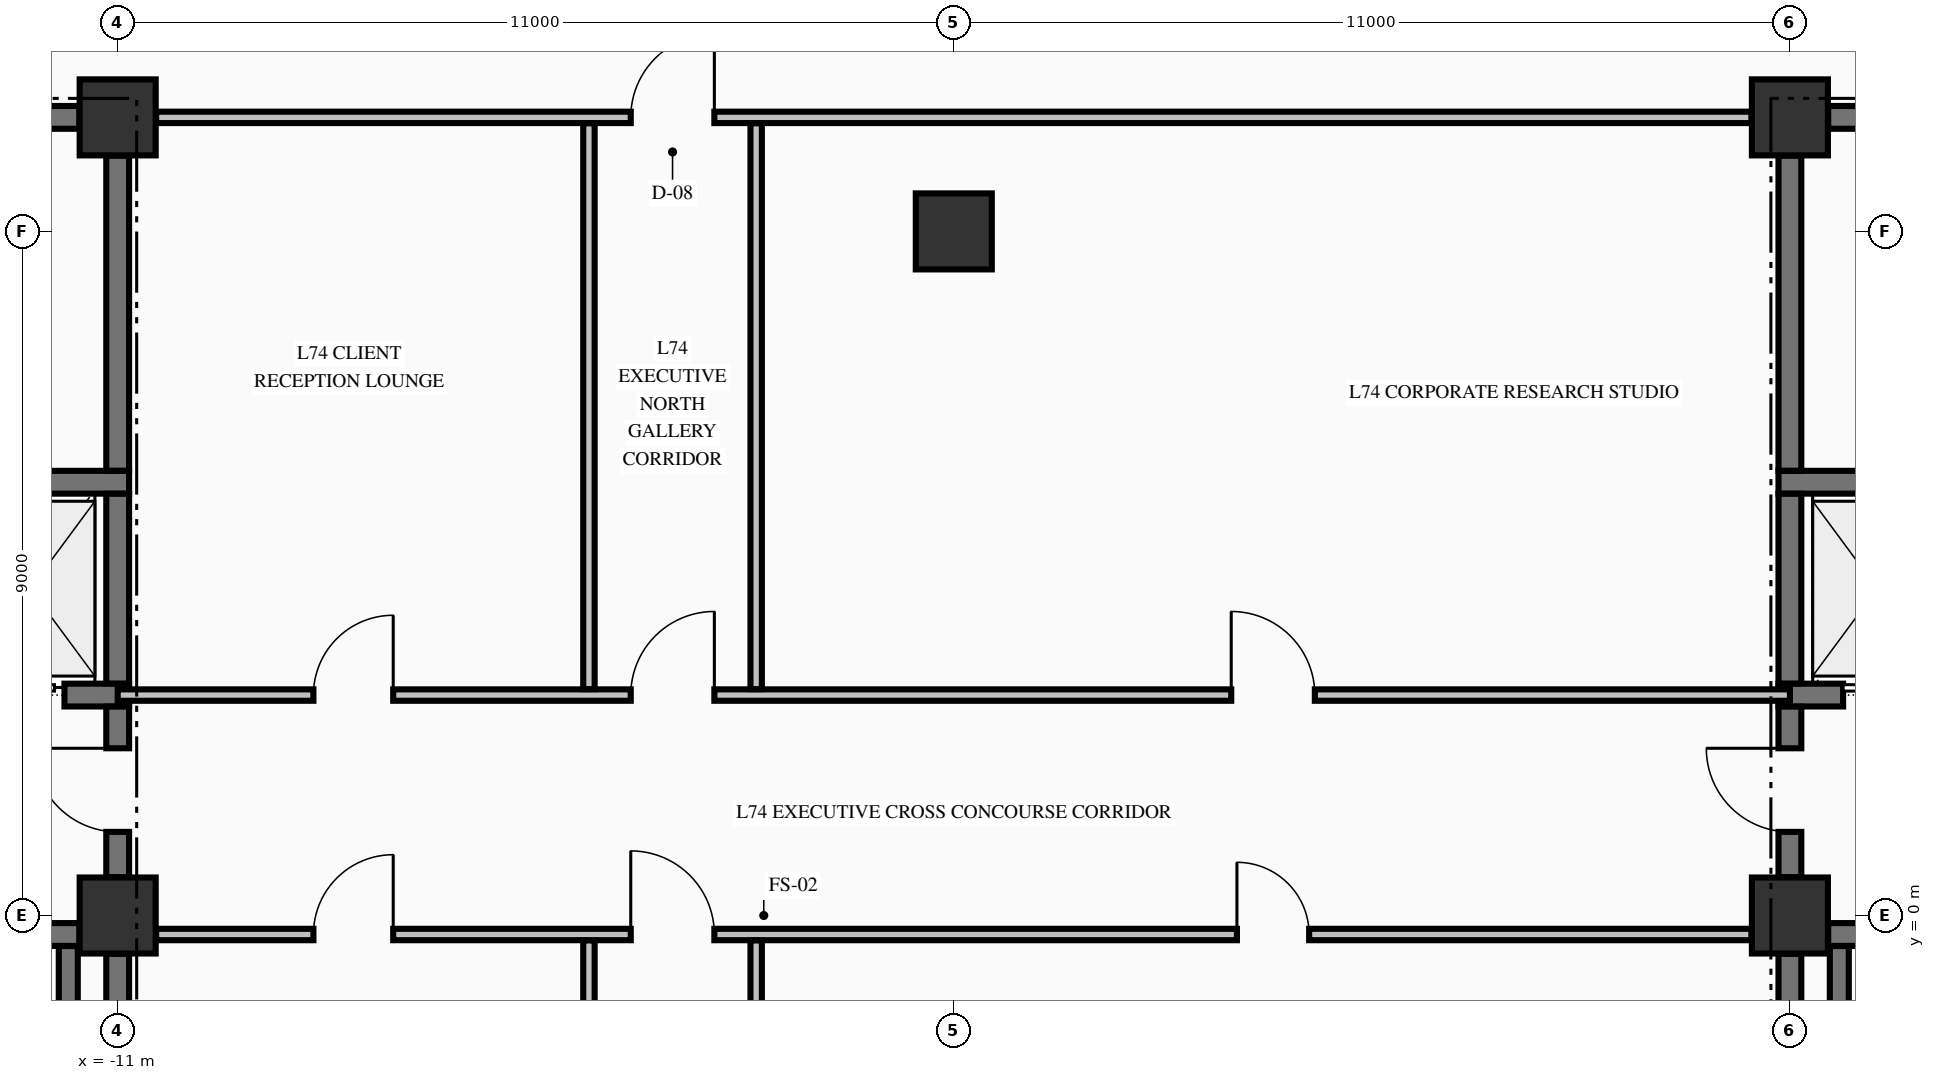
"""IFC4 building model, lengths in metres.
Left out: names, types, materials, properties, quantities, classifications, styles, units other than length and angle.
Written with IfcOpenShell. Run it as: python <this file> out.ifc"""

import sys

from ifc_helpers import new_model, si_unit, direction, frame, frame_2d, origin, origin_2d, place, context, subcontext, project, spatial, rectangle, extrude, element, fill, save


model = new_model("IFC4")
c1 = context("Model", 3, precision=1e-05, world=origin(), true_north=direction((0.0, 1.0)))
c2 = subcontext(c1, "Body", "Model", "MODEL_VIEW")
j1 = project(units=[si_unit("LENGTHUNIT", "METRE"), si_unit("PLANEANGLEUNIT", "RADIAN")], contexts=[c1])
p1 = place(None, origin())
s1 = spatial("IfcSite", under=j1, at=p1, CompositionType="ELEMENT")
p2 = place(p1, origin())
s2 = spatial("IfcBuilding", under=s1, at=p2, CompositionType="ELEMENT")
p3 = place(p2, frame((0.0, 0.0, 278.06)))
s3 = spatial("IfcBuildingStorey", under=s2, at=p3, CompositionType="ELEMENT", Elevation=278.06)
for number, where, z_axis, x_axis in (
    (1, (-11.0, 0.0, -0.425), (0.0, 0.0, 1.0), (1.0, 0.0, 0.0)),
    (2, (-11.0, 10.5, -0.425), (0.0, 0.0, 1.0), (1.0, 0.0, 0.0)),
    (3, (11.0, 0.0, -0.425), (0.0, 0.0, 1.0), (1.0, 0.0, 0.0)),
    (4, (11.0, 10.5, -0.425), (0.0, 0.0, 1.0), (1.0, 0.0, 0.0)),
    (5, (0.0, 9.0, -0.425), (0.0, 0.0, 1.0), (1.0, 0.0, 0.0)),
):
    element("IfcColumn", number, at=place(p3, frame(where, z_axis=z_axis, x_axis=x_axis)), inside=s3, PredefinedType="COLUMN", context=c2, shape_type="SweptSolid", body=[
        extrude(rectangle(XDim=1.0, YDim=1.0, at=origin_2d()), origin(), (0.0, 0.0, 1.0), 3.84),
    ])
p4 = place(p3, frame((-19.496, -0.25, 0.0), z_axis=(0.0, 0.0, 1.0), x_axis=(1.0, 0.0, 0.0)))
e6 = element("IfcWall", 6, at=p4, inside=s3, PredefinedType="SHEAR", context=c2, shape_type="SweptSolid", body=[
    extrude(rectangle(XDim=7.992, YDim=0.3, at=frame_2d((3.996, 0.0))), origin(), (0.0, 0.0, 1.0), 3.415),
])
p5 = place(p4, frame((5.796, 0.0, 0.0)))
e7 = element("IfcOpeningElement", 7, at=p5, cuts=e6, PredefinedType="OPENING", context=c2, shape_type="SweptSolid", body=[
    extrude(rectangle(XDim=1.1, YDim=2.15, at=frame_2d((0.55, 1.075))), frame((0.0, 0.16, 0.0), z_axis=(0.0, -1.0, 0.0), x_axis=(1.0, 0.0, 0.0)), (0.0, 0.0, 1.0), 0.32),
])
p6 = place(p3, frame((11.504, -0.25, 0.0), z_axis=(0.0, 0.0, 1.0), x_axis=(1.0, 0.0, 0.0)))
e8 = element("IfcWall", 8, at=p6, inside=s3, PredefinedType="SHEAR", context=c2, shape_type="SweptSolid", body=[
    extrude(rectangle(XDim=3.371, YDim=0.3, at=frame_2d((1.686, 0.0))), origin(), (0.0, 0.0, 1.0), 3.415),
])
p7 = place(p6, frame((1.096, 0.0, 0.0)))
e9 = element("IfcOpeningElement", 9, at=p7, cuts=e8, PredefinedType="OPENING", context=c2, shape_type="SweptSolid", body=[
    extrude(rectangle(XDim=1.1, YDim=2.15, at=frame_2d((0.55, 1.075))), frame((0.0, 0.16, 0.0), z_axis=(0.0, -1.0, 0.0), x_axis=(1.0, 0.0, 0.0)), (0.0, 0.0, 1.0), 0.32),
])
p8 = place(p3, frame((-14.875, 2.9, 0.0), z_axis=(0.0, 0.0, 1.0), x_axis=(1.0, 0.0, 0.0)))
e10 = element("IfcWall", 10, at=p8, inside=s3, PredefinedType="SHEAR", context=c2, shape_type="SweptSolid", body=[
    extrude(rectangle(XDim=4.025, YDim=0.3, at=frame_2d((2.012, 0.0))), origin(), (0.0, 0.0, 1.0), 3.415),
])
p9 = place(p8, frame((2.075, 0.0, 0.0)))
e11 = element("IfcOpeningElement", 11, at=p9, cuts=e10, PredefinedType="OPENING", context=c2, shape_type="SweptSolid", body=[
    extrude(rectangle(XDim=1.1, YDim=2.2, at=frame_2d((0.55, 1.1))), frame((0.0, 0.16, 0.0), z_axis=(0.0, -1.0, 0.0), x_axis=(1.0, 0.0, 0.0)), (0.0, 0.0, 1.0), 0.32),
])
p10 = place(p3, frame((10.85, 2.9, 0.0), z_axis=(0.0, 0.0, 1.0), x_axis=(1.0, 0.0, 0.0)))
e12 = element("IfcWall", 12, at=p10, inside=s3, PredefinedType="SHEAR", context=c2, shape_type="SweptSolid", body=[
    extrude(rectangle(XDim=4.025, YDim=0.3, at=frame_2d((2.012, 0.0))), origin(), (0.0, 0.0, 1.0), 3.415),
])
p11 = place(p10, frame((0.85, 0.0, 0.0)))
e13 = element("IfcOpeningElement", 13, at=p11, cuts=e12, PredefinedType="OPENING", context=c2, shape_type="SweptSolid", body=[
    extrude(rectangle(XDim=1.1, YDim=2.2, at=frame_2d((0.55, 1.1))), frame((0.0, 0.16, 0.0), z_axis=(0.0, -1.0, 0.0), x_axis=(1.0, 0.0, 0.0)), (0.0, 0.0, 1.0), 0.32),
])
for number, where, z_axis, x_axis in (
    (14, (-14.875, 5.7, 0.0), (0.0, 0.0, 1.0), (1.0, 0.0, 0.0)),
    (15, (10.85, 5.7, 0.0), (0.0, 0.0, 1.0), (1.0, 0.0, 0.0)),
):
    element("IfcWall", number, at=place(p3, frame(where, z_axis=z_axis, x_axis=x_axis)), inside=s3, PredefinedType="SHEAR", context=c2, shape_type="SweptSolid", body=[
        extrude(rectangle(XDim=4.025, YDim=0.3, at=frame_2d((2.012, 0.0))), origin(), (0.0, 0.0, 1.0), 3.415),
    ])
p12 = place(p3, frame((-14.7, 10.5, 0.0), z_axis=(0.0, 0.0, 1.0), x_axis=(1.0, 0.0, 0.0)))
e16 = element("IfcWall", 16, at=p12, inside=s3, PredefinedType="SHEAR", context=c2, shape_type="SweptSolid", body=[
    extrude(rectangle(XDim=3.196, YDim=0.3, at=frame_2d((1.598, 0.0))), origin(), (0.0, 0.0, 1.0), 3.415),
])
p13 = place(p12, frame((0.775, 0.0, 0.0)))
e17 = element("IfcOpeningElement", 17, at=p13, cuts=e16, PredefinedType="OPENING", context=c2, shape_type="SweptSolid", body=[
    extrude(rectangle(XDim=0.95, YDim=2.15, at=frame_2d((0.475, 1.075))), frame((0.0, 0.16, 0.0), z_axis=(0.0, -1.0, 0.0), x_axis=(1.0, 0.0, 0.0)), (0.0, 0.0, 1.0), 0.32),
])
p14 = place(p3, frame((11.504, 10.5, 0.0), z_axis=(0.0, 0.0, 1.0), x_axis=(1.0, 0.0, 0.0)))
e18 = element("IfcWall", 18, at=p14, inside=s3, PredefinedType="SHEAR", context=c2, shape_type="SweptSolid", body=[
    extrude(rectangle(XDim=3.196, YDim=0.3, at=frame_2d((1.598, 0.0))), origin(), (0.0, 0.0, 1.0), 3.415),
])
p15 = place(p14, frame((1.471, 0.0, 0.0)))
e19 = element("IfcOpeningElement", 19, at=p15, cuts=e18, PredefinedType="OPENING", context=c2, shape_type="SweptSolid", body=[
    extrude(rectangle(XDim=0.95, YDim=2.15, at=frame_2d((0.475, 1.075))), frame((0.0, 0.16, 0.0), z_axis=(0.0, -1.0, 0.0), x_axis=(1.0, 0.0, 0.0)), (0.0, 0.0, 1.0), 0.32),
])
p16 = place(p3, frame((-10.494, -0.25, 0.0), z_axis=(0.0, 0.0, 1.0), x_axis=(1.0, 0.0, 0.0)))
e20 = element("IfcWall", 20, at=p16, inside=s3, PredefinedType="PARTITIONING", context=c2, shape_type="SweptSolid", body=[
    extrude(rectangle(XDim=20.988, YDim=0.15, at=frame_2d((10.494, 0.0))), origin(), (0.0, 0.0, 1.0), 3.415),
])
p17 = place(p16, frame((6.244, 0.0, 0.0)))
e21 = element("IfcOpeningElement", 21, at=p17, cuts=e20, PredefinedType="OPENING", context=c2, shape_type="SweptSolid", body=[
    extrude(rectangle(XDim=1.1, YDim=2.15, at=frame_2d((0.55, 1.075))), frame((0.0, 0.085, 0.0), z_axis=(0.0, -1.0, 0.0), x_axis=(1.0, 0.0, 0.0)), (0.0, 0.0, 1.0), 0.17),
])
p18 = place(p16, frame((2.069, 0.0, 0.0)))
e22 = element("IfcOpeningElement", 22, at=p18, cuts=e20, PredefinedType="OPENING", context=c2, shape_type="SweptSolid", body=[
    extrude(rectangle(XDim=1.05, YDim=2.15, at=frame_2d((0.525, 1.075))), frame((0.0, 0.085, 0.0), z_axis=(0.0, -1.0, 0.0), x_axis=(1.0, 0.0, 0.0)), (0.0, 0.0, 1.0), 0.17),
])
p19 = place(p16, frame((14.219, 0.0, 0.0)))
e23 = element("IfcOpeningElement", 23, at=p19, cuts=e20, PredefinedType="OPENING", context=c2, shape_type="SweptSolid", body=[
    extrude(rectangle(XDim=0.95, YDim=2.15, at=frame_2d((0.475, 1.075))), frame((0.0, 0.085, 0.0), z_axis=(0.0, -1.0, 0.0), x_axis=(1.0, 0.0, 0.0)), (0.0, 0.0, 1.0), 0.17),
])
p20 = place(p3, frame((-11.0, 2.9, 0.0), z_axis=(0.0, 0.0, 1.0), x_axis=(1.0, 0.0, 0.0)))
e24 = element("IfcWall", 24, at=p20, inside=s3, PredefinedType="PARTITIONING", context=c2, shape_type="SweptSolid", body=[
    extrude(rectangle(XDim=22.0, YDim=0.15, at=frame_2d((11.0, 0.0))), origin(), (0.0, 0.0, 1.0), 3.415),
])
p21 = place(p20, frame((6.75, 0.0, 0.0)))
e25 = element("IfcOpeningElement", 25, at=p21, cuts=e24, PredefinedType="OPENING", context=c2, shape_type="SweptSolid", body=[
    extrude(rectangle(XDim=1.1, YDim=2.15, at=frame_2d((0.55, 1.075))), frame((0.0, 0.085, 0.0), z_axis=(0.0, -1.0, 0.0), x_axis=(1.0, 0.0, 0.0)), (0.0, 0.0, 1.0), 0.17),
])
p22 = place(p20, frame((2.575, 0.0, 0.0)))
e26 = element("IfcOpeningElement", 26, at=p22, cuts=e24, PredefinedType="OPENING", context=c2, shape_type="SweptSolid", body=[
    extrude(rectangle(XDim=1.05, YDim=2.15, at=frame_2d((0.525, 1.075))), frame((0.0, 0.085, 0.0), z_axis=(0.0, -1.0, 0.0), x_axis=(1.0, 0.0, 0.0)), (0.0, 0.0, 1.0), 0.17),
])
p23 = place(p20, frame((14.65, 0.0, 0.0)))
e27 = element("IfcOpeningElement", 27, at=p23, cuts=e24, PredefinedType="OPENING", context=c2, shape_type="SweptSolid", body=[
    extrude(rectangle(XDim=1.1, YDim=2.15, at=frame_2d((0.55, 1.075))), frame((0.0, 0.085, 0.0), z_axis=(0.0, -1.0, 0.0), x_axis=(1.0, 0.0, 0.0)), (0.0, 0.0, 1.0), 0.17),
])
p24 = place(p3, frame((-10.494, 10.5, 0.0), z_axis=(0.0, 0.0, 1.0), x_axis=(1.0, 0.0, 0.0)))
e28 = element("IfcWall", 28, at=p24, inside=s3, PredefinedType="PARTITIONING", context=c2, shape_type="SweptSolid", body=[
    extrude(rectangle(XDim=20.988, YDim=0.15, at=frame_2d((10.494, 0.0))), origin(), (0.0, 0.0, 1.0), 3.415),
])
p25 = place(p24, frame((6.244, 0.0, 0.0)))
e29 = element("IfcOpeningElement", 29, at=p25, cuts=e28, PredefinedType="OPENING", context=c2, shape_type="SweptSolid", body=[
    extrude(rectangle(XDim=1.1, YDim=2.15, at=frame_2d((0.55, 1.075))), frame((0.0, 0.085, 0.0), z_axis=(0.0, -1.0, 0.0), x_axis=(1.0, 0.0, 0.0)), (0.0, 0.0, 1.0), 0.17),
])
p26 = place(p3, frame((-11.65, -9.798, 0.0), z_axis=(0.0, 0.0, 1.0), x_axis=(0.0, 1.0, 0.0)))
e30 = element("IfcWall", 30, at=p26, inside=s3, PredefinedType="SOLIDWALL", context=c2, shape_type="SweptSolid", body=[
    extrude(rectangle(XDim=9.396, YDim=0.25, at=frame_2d((4.698, 0.0))), origin(), (0.0, 0.0, 1.0), 3.415),
])
p27 = place(p3, frame((-11.0, -9.446, 0.0), z_axis=(0.0, 0.0, 1.0), x_axis=(0.0, 1.0, 0.0)))
e31 = element("IfcWall", 31, at=p27, inside=s3, PredefinedType="SHEAR", context=c2, shape_type="SweptSolid", body=[
    extrude(rectangle(XDim=8.942, YDim=0.3, at=frame_2d((4.471, 0.0))), origin(), (0.0, 0.0, 1.0), 3.415),
])
p28 = place(p3, frame((-11.0, 0.504, 0.0), z_axis=(0.0, 0.0, 1.0), x_axis=(0.0, 1.0, 0.0)))
e32 = element("IfcWall", 32, at=p28, inside=s3, PredefinedType="SHEAR", context=c2, shape_type="SweptSolid", body=[
    extrude(rectangle(XDim=2.244, YDim=0.3, at=frame_2d((1.122, 0.0))), origin(), (0.0, 0.0, 1.0), 3.415),
])
p29 = place(p28, frame((0.596, 0.0, 0.0)))
e33 = element("IfcOpeningElement", 33, at=p29, cuts=e32, PredefinedType="OPENING", context=c2, shape_type="SweptSolid", body=[
    extrude(rectangle(XDim=1.1, YDim=2.15, at=frame_2d((0.55, 1.075))), frame((0.0, 0.16, 0.0), z_axis=(0.0, -1.0, 0.0), x_axis=(1.0, 0.0, 0.0)), (0.0, 0.0, 1.0), 0.32),
])
p30 = place(p3, frame((-11.0, 3.052, 0.0), z_axis=(0.0, 0.0, 1.0), x_axis=(0.0, 1.0, 0.0)))
e34 = element("IfcWall", 34, at=p30, inside=s3, PredefinedType="SHEAR", context=c2, shape_type="SweptSolid", body=[
    extrude(rectangle(XDim=2.496, YDim=0.3, at=frame_2d((1.248, 0.0))), origin(), (0.0, 0.0, 1.0), 3.415),
])
p31 = place(p3, frame((-11.0, 5.852, 0.0), z_axis=(0.0, 0.0, 1.0), x_axis=(0.0, 1.0, 0.0)))
e35 = element("IfcWall", 35, at=p31, inside=s3, PredefinedType="SHEAR", context=c2, shape_type="SweptSolid", body=[
    extrude(rectangle(XDim=4.144, YDim=0.3, at=frame_2d((2.072, 0.0))), origin(), (0.0, 0.0, 1.0), 3.415),
])
p32 = place(p3, frame((11.0, -9.446, 0.0), z_axis=(0.0, 0.0, 1.0), x_axis=(0.0, 1.0, 0.0)))
e36 = element("IfcWall", 36, at=p32, inside=s3, PredefinedType="SHEAR", context=c2, shape_type="SweptSolid", body=[
    extrude(rectangle(XDim=8.942, YDim=0.3, at=frame_2d((4.471, 0.0))), origin(), (0.0, 0.0, 1.0), 3.415),
])
p33 = place(p3, frame((11.0, 0.504, 0.0), z_axis=(0.0, 0.0, 1.0), x_axis=(0.0, 1.0, 0.0)))
e37 = element("IfcWall", 37, at=p33, inside=s3, PredefinedType="SHEAR", context=c2, shape_type="SweptSolid", body=[
    extrude(rectangle(XDim=2.244, YDim=0.3, at=frame_2d((1.122, 0.0))), origin(), (0.0, 0.0, 1.0), 3.415),
])
p34 = place(p33, frame((0.596, 0.0, 0.0)))
e38 = element("IfcOpeningElement", 38, at=p34, cuts=e37, PredefinedType="OPENING", context=c2, shape_type="SweptSolid", body=[
    extrude(rectangle(XDim=1.1, YDim=2.15, at=frame_2d((0.55, 1.075))), frame((0.0, 0.16, 0.0), z_axis=(0.0, -1.0, 0.0), x_axis=(1.0, 0.0, 0.0)), (0.0, 0.0, 1.0), 0.32),
])
p35 = place(p3, frame((11.0, 3.052, 0.0), z_axis=(0.0, 0.0, 1.0), x_axis=(0.0, 1.0, 0.0)))
e39 = element("IfcWall", 39, at=p35, inside=s3, PredefinedType="SHEAR", context=c2, shape_type="SweptSolid", body=[
    extrude(rectangle(XDim=2.496, YDim=0.3, at=frame_2d((1.248, 0.0))), origin(), (0.0, 0.0, 1.0), 3.415),
])
p36 = place(p3, frame((11.0, 5.852, 0.0), z_axis=(0.0, 0.0, 1.0), x_axis=(0.0, 1.0, 0.0)))
e40 = element("IfcWall", 40, at=p36, inside=s3, PredefinedType="SHEAR", context=c2, shape_type="SweptSolid", body=[
    extrude(rectangle(XDim=4.144, YDim=0.3, at=frame_2d((2.072, 0.0))), origin(), (0.0, 0.0, 1.0), 3.415),
])
p37 = place(p3, frame((11.65, -9.798, 0.0), z_axis=(0.0, 0.0, 1.0), x_axis=(0.0, 1.0, 0.0)))
e41 = element("IfcWall", 41, at=p37, inside=s3, PredefinedType="SOLIDWALL", context=c2, shape_type="SweptSolid", body=[
    extrude(rectangle(XDim=9.396, YDim=0.25, at=frame_2d((4.698, 0.0))), origin(), (0.0, 0.0, 1.0), 3.415),
])
p38 = place(p3, frame((-4.8, -9.872, 0.0), z_axis=(0.0, 0.0, 1.0), x_axis=(0.0, 1.0, 0.0)))
e42 = element("IfcWall", 42, at=p38, inside=s3, PredefinedType="PARTITIONING", context=c2, shape_type="SweptSolid", body=[
    extrude(rectangle(XDim=9.544, YDim=0.15, at=frame_2d((4.772, 0.0))), origin(), (0.0, 0.0, 1.0), 3.415),
])
p39 = place(p3, frame((-4.8, 2.978, 0.0), z_axis=(0.0, 0.0, 1.0), x_axis=(0.0, 1.0, 0.0)))
e43 = element("IfcWall", 43, at=p39, inside=s3, PredefinedType="PARTITIONING", context=c2, shape_type="SweptSolid", body=[
    extrude(rectangle(XDim=7.444, YDim=0.15, at=frame_2d((3.722, 0.0))), origin(), (0.0, 0.0, 1.0), 3.415),
])
p40 = place(p3, frame((-2.6, -5.247, 0.0), z_axis=(0.0, 0.0, 1.0), x_axis=(0.0, 1.0, 0.0)))
e44 = element("IfcWall", 44, at=p40, inside=s3, PredefinedType="PARTITIONING", context=c2, shape_type="SweptSolid", body=[
    extrude(rectangle(XDim=4.919, YDim=0.15, at=frame_2d((2.459, 0.0))), origin(), (0.0, 0.0, 1.0), 3.415),
])
p41 = place(p3, frame((-2.6, 2.978, 0.0), z_axis=(0.0, 0.0, 1.0), x_axis=(0.0, 1.0, 0.0)))
e45 = element("IfcWall", 45, at=p41, inside=s3, PredefinedType="PARTITIONING", context=c2, shape_type="SweptSolid", body=[
    extrude(rectangle(XDim=7.444, YDim=0.15, at=frame_2d((3.722, 0.0))), origin(), (0.0, 0.0, 1.0), 3.415),
])
p42 = place(p29, origin())
e46 = element("IfcDoor", 46, at=p42, inside=s3, OperationType="SINGLE_SWING_RIGHT", PredefinedType="DOOR", context=c2, shape_type="SweptSolid", body=[
    extrude(rectangle(XDim=1.1, YDim=2.15, at=frame_2d((0.55, 1.075))), frame((0.0, 0.025, 0.0), z_axis=(0.0, -1.0, 0.0), x_axis=(1.0, 0.0, 0.0)), (0.0, 0.0, 1.0), 0.05),
])
fill(e33, e46)
p43 = place(p9, origin())
e47 = element("IfcDoor", 47, at=p43, inside=s3, OperationType="SLIDING_TO_LEFT", PredefinedType="DOOR", context=c2, shape_type="SweptSolid", body=[
    extrude(rectangle(XDim=1.1, YDim=2.2, at=frame_2d((0.55, 1.1))), frame((0.0, 0.025, 0.0), z_axis=(0.0, -1.0, 0.0), x_axis=(1.0, 0.0, 0.0)), (0.0, 0.0, 1.0), 0.05),
])
fill(e11, e47)
p44 = place(p34, origin())
e48 = element("IfcDoor", 48, at=p44, inside=s3, OperationType="SINGLE_SWING_RIGHT", PredefinedType="DOOR", context=c2, shape_type="SweptSolid", body=[
    extrude(rectangle(XDim=1.1, YDim=2.15, at=frame_2d((0.55, 1.075))), frame((0.0, 0.025, 0.0), z_axis=(0.0, -1.0, 0.0), x_axis=(1.0, 0.0, 0.0)), (0.0, 0.0, 1.0), 0.05),
])
fill(e38, e48)
p45 = place(p11, origin())
e49 = element("IfcDoor", 49, at=p45, inside=s3, OperationType="SLIDING_TO_RIGHT", PredefinedType="DOOR", context=c2, shape_type="SweptSolid", body=[
    extrude(rectangle(XDim=1.1, YDim=2.2, at=frame_2d((0.55, 1.1))), frame((0.0, 0.025, 0.0), z_axis=(0.0, -1.0, 0.0), x_axis=(1.0, 0.0, 0.0)), (0.0, 0.0, 1.0), 0.05),
])
fill(e13, e49)
p46 = place(p25, origin())
e50 = element("IfcDoor", 50, at=p46, inside=s3, OperationType="SINGLE_SWING_RIGHT", PredefinedType="DOOR", context=c2, shape_type="SweptSolid", body=[
    extrude(rectangle(XDim=1.1, YDim=2.15, at=frame_2d((0.55, 1.075))), frame((0.0, 0.025, 0.0), z_axis=(0.0, -1.0, 0.0), x_axis=(1.0, 0.0, 0.0)), (0.0, 0.0, 1.0), 0.05),
])
fill(e29, e50)
p47 = place(p21, origin())
e51 = element("IfcDoor", 51, at=p47, inside=s3, OperationType="SINGLE_SWING_RIGHT", PredefinedType="DOOR", context=c2, shape_type="SweptSolid", body=[
    extrude(rectangle(XDim=1.1, YDim=2.15, at=frame_2d((0.55, 1.075))), frame((0.0, 0.025, 0.0), z_axis=(0.0, -1.0, 0.0), x_axis=(1.0, 0.0, 0.0)), (0.0, 0.0, 1.0), 0.05),
])
fill(e25, e51)
p48 = place(p17, origin())
e52 = element("IfcDoor", 52, at=p48, inside=s3, OperationType="SINGLE_SWING_LEFT", PredefinedType="DOOR", context=c2, shape_type="SweptSolid", body=[
    extrude(rectangle(XDim=1.1, YDim=2.15, at=frame_2d((0.55, 1.075))), frame((0.0, 0.025, 0.0), z_axis=(0.0, -1.0, 0.0), x_axis=(1.0, 0.0, 0.0)), (0.0, 0.0, 1.0), 0.05),
])
fill(e21, e52)
p49 = place(p22, origin())
e53 = element("IfcDoor", 53, at=p49, inside=s3, OperationType="SINGLE_SWING_RIGHT", PredefinedType="DOOR", context=c2, shape_type="SweptSolid", body=[
    extrude(rectangle(XDim=1.05, YDim=2.15, at=frame_2d((0.525, 1.075))), frame((0.0, 0.025, 0.0), z_axis=(0.0, -1.0, 0.0), x_axis=(1.0, 0.0, 0.0)), (0.0, 0.0, 1.0), 0.05),
])
fill(e26, e53)
p50 = place(p23, origin())
e54 = element("IfcDoor", 54, at=p50, inside=s3, OperationType="SINGLE_SWING_LEFT", PredefinedType="DOOR", context=c2, shape_type="SweptSolid", body=[
    extrude(rectangle(XDim=1.1, YDim=2.15, at=frame_2d((0.55, 1.075))), frame((0.0, 0.025, 0.0), z_axis=(0.0, -1.0, 0.0), x_axis=(1.0, 0.0, 0.0)), (0.0, 0.0, 1.0), 0.05),
])
fill(e27, e54)
p51 = place(p18, origin())
e55 = element("IfcDoor", 55, at=p51, inside=s3, OperationType="SINGLE_SWING_RIGHT", PredefinedType="DOOR", context=c2, shape_type="SweptSolid", body=[
    extrude(rectangle(XDim=1.05, YDim=2.15, at=frame_2d((0.525, 1.075))), frame((0.0, 0.025, 0.0), z_axis=(0.0, -1.0, 0.0), x_axis=(1.0, 0.0, 0.0)), (0.0, 0.0, 1.0), 0.05),
])
fill(e22, e55)
p52 = place(p19, origin())
e56 = element("IfcDoor", 56, at=p52, inside=s3, OperationType="SINGLE_SWING_LEFT", PredefinedType="DOOR", context=c2, shape_type="SweptSolid", body=[
    extrude(rectangle(XDim=0.95, YDim=2.15, at=frame_2d((0.475, 1.075))), frame((0.0, 0.025, 0.0), z_axis=(0.0, -1.0, 0.0), x_axis=(1.0, 0.0, 0.0)), (0.0, 0.0, 1.0), 0.05),
])
fill(e23, e56)
save(model, sys.argv[1])
